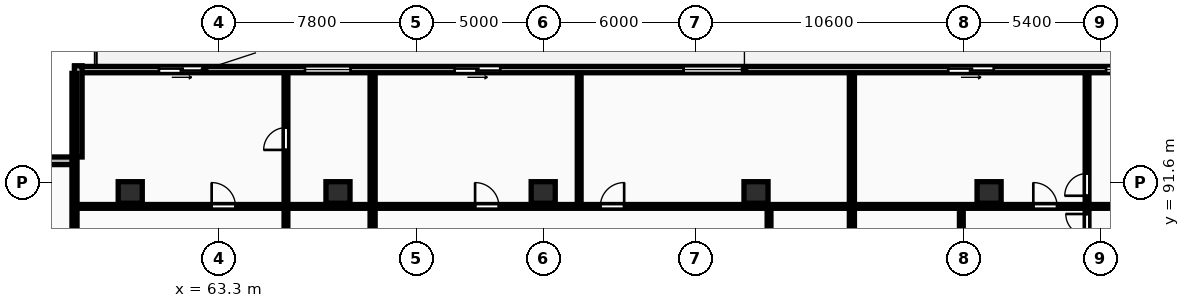
"""IFC4 building model, lengths in metres.
Left out: names, types, materials, properties, quantities, classifications, styles, units other than length and angle.
Written with IfcOpenShell. Run it as: python <this file> out.ifc"""

import sys

from ifc_helpers import new_model, si_unit, direction, frame, frame_2d, origin, origin_2d, place, context, subcontext, project, spatial, rectangle, extrude, element, fill, save


model = new_model("IFC4")
c1 = context("Model", 3, precision=1e-05, world=origin(), true_north=direction((0.0, 1.0)))
c2 = subcontext(c1, "Body", "Model", "MODEL_VIEW")
j1 = project(units=[si_unit("LENGTHUNIT", "METRE"), si_unit("PLANEANGLEUNIT", "RADIAN")], contexts=[c1])
p1 = place(None, origin())
s1 = spatial("IfcSite", under=j1, at=p1, CompositionType="ELEMENT")
p2 = place(p1, origin())
s2 = spatial("IfcBuilding", under=s1, at=p2, CompositionType="ELEMENT")
p3 = place(p2, frame((0.0, 0.0, 87.3)))
s3 = spatial("IfcBuildingStorey", under=s2, at=p3, CompositionType="ELEMENT", Elevation=87.3)
for number, where, z_axis, x_axis in (
    (1, (59.8, 91.2, 0.0), (0.0, 0.0, 1.0), (1.0, 0.0, 0.0)),
    (2, (68.0, 91.2, 0.0), (0.0, 0.0, 1.0), (1.0, 0.0, 0.0)),
    (3, (76.1, 91.2, 0.0), (0.0, 0.0, 1.0), (1.0, 0.0, 0.0)),
    (4, (84.5, 91.2, 0.0), (0.0, 0.0, 1.0), (1.0, 0.0, 0.0)),
    (5, (93.7, 91.2, 0.0), (0.0, 0.0, 1.0), (1.0, 0.0, 0.0)),
):
    element("IfcColumn", number, at=place(p3, frame(where, z_axis=z_axis, x_axis=x_axis)), inside=s3, PredefinedType="COLUMN", context=c2, shape_type="SweptSolid", body=[
        extrude(rectangle(XDim=0.95, YDim=0.85, at=origin_2d()), origin(), (0.0, 0.0, 1.0), 3.25),
    ])
p4 = place(p3, frame((130.6, 96.05, 0.0), z_axis=(0.0, 0.0, 1.0), x_axis=(-1.0, 0.0, 0.0)))
e6 = element("IfcWall", 6, at=p4, inside=s3, PredefinedType="STANDARD", context=c2, shape_type="SweptSolid", body=[
    extrude(rectangle(XDim=73.0, YDim=0.25, at=frame_2d((36.5, 0.0))), origin(), (0.0, 0.0, 1.0), 2.97),
])
p5 = place(p4, frame((67.867, 0.0, 0.0)))
e7 = element("IfcOpeningElement", 7, at=p5, cuts=e6, PredefinedType="OPENING", context=c2, shape_type="SweptSolid", body=[
    extrude(rectangle(XDim=1.8, YDim=2.2, at=frame_2d((0.9, 1.1))), frame((0.0, 0.135, 0.0), z_axis=(0.0, -1.0, 0.0), x_axis=(1.0, 0.0, 0.0)), (0.0, 0.0, 1.0), 0.27),
])
p6 = place(p4, frame((62.103, 0.0, 0.85)))
e8 = element("IfcOpeningElement", 8, at=p6, cuts=e6, PredefinedType="OPENING", context=c2, shape_type="SweptSolid", body=[
    extrude(rectangle(XDim=1.8, YDim=1.8, at=frame_2d((0.9, 0.9))), frame((0.0, 0.135, 0.0), z_axis=(0.0, -1.0, 0.0), x_axis=(1.0, 0.0, 0.0)), (0.0, 0.0, 1.0), 0.27),
])
p7 = place(p4, frame((56.196, 0.0, 0.0)))
e9 = element("IfcOpeningElement", 9, at=p7, cuts=e6, PredefinedType="OPENING", context=c2, shape_type="SweptSolid", body=[
    extrude(rectangle(XDim=1.8, YDim=2.2, at=frame_2d((0.9, 1.1))), frame((0.0, 0.135, 0.0), z_axis=(0.0, -1.0, 0.0), x_axis=(1.0, 0.0, 0.0)), (0.0, 0.0, 1.0), 0.27),
])
p8 = place(p4, frame((46.557, 0.0, 0.85)))
e10 = element("IfcOpeningElement", 10, at=p8, cuts=e6, PredefinedType="OPENING", context=c2, shape_type="SweptSolid", body=[
    extrude(rectangle(XDim=2.4, YDim=1.9, at=frame_2d((1.2, 0.95))), frame((0.0, 0.135, 0.0), z_axis=(0.0, -1.0, 0.0), x_axis=(1.0, 0.0, 0.0)), (0.0, 0.0, 1.0), 0.27),
])
p9 = place(p4, frame((36.714, 0.0, 0.0)))
e11 = element("IfcOpeningElement", 11, at=p9, cuts=e6, PredefinedType="OPENING", context=c2, shape_type="SweptSolid", body=[
    extrude(rectangle(XDim=1.8, YDim=2.2, at=frame_2d((0.9, 1.1))), frame((0.0, 0.135, 0.0), z_axis=(0.0, -1.0, 0.0), x_axis=(1.0, 0.0, 0.0)), (0.0, 0.0, 1.0), 0.27),
])
p10 = place(p4, frame((30.483, 0.0, 0.85)))
e12 = element("IfcOpeningElement", 12, at=p10, cuts=e6, PredefinedType="OPENING", context=c2, shape_type="SweptSolid", body=[
    extrude(rectangle(XDim=1.8, YDim=1.8, at=frame_2d((0.9, 0.9))), frame((0.0, 0.135, 0.0), z_axis=(0.0, -1.0, 0.0), x_axis=(1.0, 0.0, 0.0)), (0.0, 0.0, 1.0), 0.27),
])
p11 = place(p4, frame((21.29, 0.0, 0.85)))
e13 = element("IfcOpeningElement", 13, at=p11, cuts=e6, PredefinedType="OPENING", context=c2, shape_type="SweptSolid", body=[
    extrude(rectangle(XDim=2.4, YDim=1.9, at=frame_2d((1.2, 0.95))), frame((0.0, 0.135, 0.0), z_axis=(0.0, -1.0, 0.0), x_axis=(1.0, 0.0, 0.0)), (0.0, 0.0, 1.0), 0.27),
])
p12 = place(p4, frame((17.593, 0.0, 0.85)))
e14 = element("IfcOpeningElement", 14, at=p12, cuts=e6, PredefinedType="OPENING", context=c2, shape_type="SweptSolid", body=[
    extrude(rectangle(XDim=1.8, YDim=1.8, at=frame_2d((0.9, 0.9))), frame((0.0, 0.135, 0.0), z_axis=(0.0, -1.0, 0.0), x_axis=(1.0, 0.0, 0.0)), (0.0, 0.0, 1.0), 0.27),
])
p13 = place(p4, frame((26.153, 0.0, 0.0)))
e15 = element("IfcOpeningElement", 15, at=p13, cuts=e6, PredefinedType="OPENING", context=c2, shape_type="SweptSolid", body=[
    extrude(rectangle(XDim=1.8, YDim=2.2, at=frame_2d((0.9, 1.1))), frame((0.0, 0.135, 0.0), z_axis=(0.0, -1.0, 0.0), x_axis=(1.0, 0.0, 0.0)), (0.0, 0.0, 1.0), 0.27),
])
p14 = place(p4, frame((13.753, 0.0, 0.85)))
e16 = element("IfcOpeningElement", 16, at=p14, cuts=e6, PredefinedType="OPENING", context=c2, shape_type="SweptSolid", body=[
    extrude(rectangle(XDim=1.8, YDim=1.8, at=frame_2d((0.9, 0.9))), frame((0.0, 0.135, 0.0), z_axis=(0.0, -1.0, 0.0), x_axis=(1.0, 0.0, 0.0)), (0.0, 0.0, 1.0), 0.27),
])
p15 = place(p4, frame((7.363, 0.0, 0.0)))
e17 = element("IfcOpeningElement", 17, at=p15, cuts=e6, PredefinedType="OPENING", context=c2, shape_type="SweptSolid", body=[
    extrude(rectangle(XDim=1.8, YDim=2.2, at=frame_2d((0.9, 1.1))), frame((0.0, 0.135, 0.0), z_axis=(0.0, -1.0, 0.0), x_axis=(1.0, 0.0, 0.0)), (0.0, 0.0, 1.0), 0.27),
])
p16 = place(p4, frame((0.9, 0.0, 0.85)))
e18 = element("IfcOpeningElement", 18, at=p16, cuts=e6, PredefinedType="OPENING", context=c2, shape_type="SweptSolid", body=[
    extrude(rectangle(XDim=2.4, YDim=1.9, at=frame_2d((1.2, 0.95))), frame((0.0, 0.135, 0.0), z_axis=(0.0, -1.0, 0.0), x_axis=(1.0, 0.0, 0.0)), (0.0, 0.0, 1.0), 0.27),
])
p17 = place(p3, frame((57.75, 96.2, 0.0), z_axis=(0.0, 0.0, 1.0), x_axis=(0.0, -1.0, 0.0)))
e19 = element("IfcWall", 19, at=p17, inside=s3, PredefinedType="STANDARD", context=c2, shape_type="SweptSolid", body=[
    extrude(rectangle(XDim=3.6, YDim=0.3, at=frame_2d((1.8, 0.0))), origin(), (0.0, 0.0, 1.0), 2.97),
])
p18 = place(p3, frame((57.6, 92.45, 0.0), z_axis=(0.0, 0.0, 1.0), x_axis=(-1.0, 0.0, 0.0)))
e20 = element("IfcWall", 20, at=p18, inside=s3, PredefinedType="STANDARD", context=c2, shape_type="SweptSolid", body=[
    extrude(rectangle(XDim=3.6, YDim=0.3, at=frame_2d((1.8, 0.0))), origin(), (0.0, 0.0, 1.0), 2.97),
])
for number, where, z_axis, x_axis in (
    (21, (57.6, 69.43, 0.0), (0.0, 0.0, 1.0), (0.0, 1.0, 0.0)),
    (22, (69.367, 69.43, 0.0), (0.0, 0.0, 1.0), (0.0, 1.0, 0.0)),
):
    element("IfcWall", number, at=place(p3, frame(where, z_axis=z_axis, x_axis=x_axis)), inside=s3, PredefinedType="PARTITIONING", context=c2, shape_type="SweptSolid", body=[
        extrude(rectangle(XDim=26.47, YDim=0.2, at=frame_2d((13.235, 0.0))), origin(), (0.0, 0.0, 1.0), 2.97),
    ])
p19 = place(p3, frame((65.947, 85.59, 0.0), z_axis=(0.0, 0.0, 1.0), x_axis=(0.0, 1.0, 0.0)))
e23 = element("IfcWall", 23, at=p19, inside=s3, PredefinedType="PARTITIONING", context=c2, shape_type="SweptSolid", body=[
    extrude(rectangle(XDim=10.31, YDim=0.15, at=frame_2d((5.155, 0.0))), origin(), (0.0, 0.0, 1.0), 2.97),
])
p20 = place(p19, frame((1.43, 0.0, 0.0)))
e24 = element("IfcOpeningElement", 24, at=p20, cuts=e23, PredefinedType="OPENING", context=c2, shape_type="SweptSolid", body=[
    extrude(rectangle(XDim=0.84, YDim=2.04, at=frame_2d((0.42, 1.02))), frame((0.0, 0.085, 0.0), z_axis=(0.0, -1.0, 0.0), x_axis=(1.0, 0.0, 0.0)), (0.0, 0.0, 1.0), 0.17),
])
p21 = place(p19, frame((3.102, 0.0, 0.0)))
e25 = element("IfcOpeningElement", 25, at=p21, cuts=e23, PredefinedType="OPENING", context=c2, shape_type="SweptSolid", body=[
    extrude(rectangle(XDim=0.84, YDim=2.04, at=frame_2d((0.42, 1.02))), frame((0.0, 0.085, 0.0), z_axis=(0.0, -1.0, 0.0), x_axis=(1.0, 0.0, 0.0)), (0.0, 0.0, 1.0), 0.17),
])
p22 = place(p19, frame((7.29, 0.0, 0.0)))
e26 = element("IfcOpeningElement", 26, at=p22, cuts=e23, PredefinedType="OPENING", context=c2, shape_type="SweptSolid", body=[
    extrude(rectangle(XDim=0.88, YDim=2.06, at=frame_2d((0.44, 1.03))), frame((0.0, 0.085, 0.0), z_axis=(0.0, -1.0, 0.0), x_axis=(1.0, 0.0, 0.0)), (0.0, 0.0, 1.0), 0.17),
])
p23 = place(p3, frame((57.68, 90.65, 0.0), z_axis=(0.0, 0.0, 1.0), x_axis=(1.0, 0.0, 0.0)))
e27 = element("IfcWall", 27, at=p23, inside=s3, PredefinedType="PARTITIONING", context=c2, shape_type="SweptSolid", body=[
    extrude(rectangle(XDim=11.607, YDim=0.15, at=frame_2d((5.803, 0.0))), origin(), (0.0, 0.0, 1.0), 2.97),
])
p24 = place(p23, frame((5.333, 0.0, 0.0)))
e28 = element("IfcOpeningElement", 28, at=p24, cuts=e27, PredefinedType="OPENING", context=c2, shape_type="SweptSolid", body=[
    extrude(rectangle(XDim=0.94, YDim=2.1, at=frame_2d((0.47, 1.05))), frame((0.0, 0.085, 0.0), z_axis=(0.0, -1.0, 0.0), x_axis=(1.0, 0.0, 0.0)), (0.0, 0.0, 1.0), 0.17),
])
p25 = place(p3, frame((88.285, 69.43, 0.0), z_axis=(0.0, 0.0, 1.0), x_axis=(0.0, 1.0, 0.0)))
e29 = element("IfcWall", 29, at=p25, inside=s3, PredefinedType="PARTITIONING", context=c2, shape_type="SweptSolid", body=[
    extrude(rectangle(XDim=26.47, YDim=0.2, at=frame_2d((13.235, 0.0))), origin(), (0.0, 0.0, 1.0), 2.97),
])
p26 = place(p3, frame((85.015, 69.41, 0.0), z_axis=(0.0, 0.0, 1.0), x_axis=(0.0, 1.0, 0.0)))
e30 = element("IfcWall", 30, at=p26, inside=s3, PredefinedType="PARTITIONING", context=c2, shape_type="SweptSolid", body=[
    extrude(rectangle(XDim=21.18, YDim=0.15, at=frame_2d((10.59, 0.0))), origin(), (0.0, 0.0, 1.0), 2.97),
])
p27 = place(p26, frame((2.406, 0.0, 0.0)))
e31 = element("IfcOpeningElement", 31, at=p27, cuts=e30, PredefinedType="OPENING", context=c2, shape_type="SweptSolid", body=[
    extrude(rectangle(XDim=0.96, YDim=2.1, at=frame_2d((0.48, 1.05))), frame((0.0, 0.085, 0.0), z_axis=(0.0, -1.0, 0.0), x_axis=(1.0, 0.0, 0.0)), (0.0, 0.0, 1.0), 0.17),
])
p28 = place(p26, frame((6.133, 0.0, 0.0)))
e32 = element("IfcOpeningElement", 32, at=p28, cuts=e30, PredefinedType="OPENING", context=c2, shape_type="SweptSolid", body=[
    extrude(rectangle(XDim=0.88, YDim=2.06, at=frame_2d((0.44, 1.03))), frame((0.0, 0.085, 0.0), z_axis=(0.0, -1.0, 0.0), x_axis=(1.0, 0.0, 0.0)), (0.0, 0.0, 1.0), 0.17),
])
p29 = place(p26, frame((12.003, 0.0, 0.0)))
e33 = element("IfcOpeningElement", 33, at=p29, cuts=e30, PredefinedType="OPENING", context=c2, shape_type="SweptSolid", body=[
    extrude(rectangle(XDim=0.84, YDim=2.04, at=frame_2d((0.42, 1.02))), frame((0.0, 0.085, 0.0), z_axis=(0.0, -1.0, 0.0), x_axis=(1.0, 0.0, 0.0)), (0.0, 0.0, 1.0), 0.17),
])
p30 = place(p3, frame((77.521, 90.73, 0.0), z_axis=(0.0, 0.0, 1.0), x_axis=(0.0, 1.0, 0.0)))
e34 = element("IfcWall", 34, at=p30, inside=s3, PredefinedType="PARTITIONING", context=c2, shape_type="SweptSolid", body=[
    extrude(rectangle(XDim=5.17, YDim=0.15, at=frame_2d((2.585, 0.0))), origin(), (0.0, 0.0, 1.0), 2.97),
])
p31 = place(p3, frame((69.447, 90.65, 0.0), z_axis=(0.0, 0.0, 1.0), x_axis=(1.0, 0.0, 0.0)))
e35 = element("IfcWall", 35, at=p31, inside=s3, PredefinedType="PARTITIONING", context=c2, shape_type="SweptSolid", body=[
    extrude(rectangle(XDim=18.758, YDim=0.15, at=frame_2d((9.379, 0.0))), origin(), (0.0, 0.0, 1.0), 2.97),
])
p32 = place(p31, frame((3.965, 0.0, 0.0)))
e36 = element("IfcOpeningElement", 36, at=p32, cuts=e35, PredefinedType="OPENING", context=c2, shape_type="SweptSolid", body=[
    extrude(rectangle(XDim=0.94, YDim=2.1, at=frame_2d((0.47, 1.05))), frame((0.0, 0.085, 0.0), z_axis=(0.0, -1.0, 0.0), x_axis=(1.0, 0.0, 0.0)), (0.0, 0.0, 1.0), 0.17),
])
p33 = place(p31, frame((8.909, 0.0, 0.0)))
e37 = element("IfcOpeningElement", 37, at=p33, cuts=e35, PredefinedType="OPENING", context=c2, shape_type="SweptSolid", body=[
    extrude(rectangle(XDim=0.94, YDim=2.1, at=frame_2d((0.47, 1.05))), frame((0.0, 0.085, 0.0), z_axis=(0.0, -1.0, 0.0), x_axis=(1.0, 0.0, 0.0)), (0.0, 0.0, 1.0), 0.17),
])
p34 = place(p3, frame((92.604, 85.59, 0.0), z_axis=(0.0, 0.0, 1.0), x_axis=(0.0, 1.0, 0.0)))
e38 = element("IfcWall", 38, at=p34, inside=s3, PredefinedType="PARTITIONING", context=c2, shape_type="SweptSolid", body=[
    extrude(rectangle(XDim=5.0, YDim=0.15, at=frame_2d((2.5, 0.0))), origin(), (0.0, 0.0, 1.0), 2.97),
])
p35 = place(p34, frame((2.06, 0.0, 0.0)))
e39 = element("IfcOpeningElement", 39, at=p35, cuts=e38, PredefinedType="OPENING", context=c2, shape_type="SweptSolid", body=[
    extrude(rectangle(XDim=0.88, YDim=2.06, at=frame_2d((0.44, 1.03))), frame((0.0, 0.085, 0.0), z_axis=(0.0, -1.0, 0.0), x_axis=(1.0, 0.0, 0.0)), (0.0, 0.0, 1.0), 0.17),
])
p36 = place(p3, frame((97.567, 85.59, 0.0), z_axis=(0.0, 0.0, 1.0), x_axis=(0.0, 1.0, 0.0)))
e40 = element("IfcWall", 40, at=p36, inside=s3, PredefinedType="PARTITIONING", context=c2, shape_type="SweptSolid", body=[
    extrude(rectangle(XDim=10.31, YDim=0.15, at=frame_2d((5.155, 0.0))), origin(), (0.0, 0.0, 1.0), 2.97),
])
p37 = place(p36, frame((1.43, 0.0, 0.0)))
e41 = element("IfcOpeningElement", 41, at=p37, cuts=e40, PredefinedType="OPENING", context=c2, shape_type="SweptSolid", body=[
    extrude(rectangle(XDim=0.84, YDim=2.04, at=frame_2d((0.42, 1.02))), frame((0.0, 0.085, 0.0), z_axis=(0.0, -1.0, 0.0), x_axis=(1.0, 0.0, 0.0)), (0.0, 0.0, 1.0), 0.17),
])
p38 = place(p36, frame((3.92, 0.0, 0.0)))
e42 = element("IfcOpeningElement", 42, at=p38, cuts=e40, PredefinedType="OPENING", context=c2, shape_type="SweptSolid", body=[
    extrude(rectangle(XDim=0.84, YDim=2.04, at=frame_2d((0.42, 1.02))), frame((0.0, 0.085, 0.0), z_axis=(0.0, -1.0, 0.0), x_axis=(1.0, 0.0, 0.0)), (0.0, 0.0, 1.0), 0.17),
])
p39 = place(p36, frame((5.48, 0.0, 0.0)))
e43 = element("IfcOpeningElement", 43, at=p39, cuts=e40, PredefinedType="OPENING", context=c2, shape_type="SweptSolid", body=[
    extrude(rectangle(XDim=0.88, YDim=2.06, at=frame_2d((0.44, 1.03))), frame((0.0, 0.085, 0.0), z_axis=(0.0, -1.0, 0.0), x_axis=(1.0, 0.0, 0.0)), (0.0, 0.0, 1.0), 0.17),
])
p40 = place(p3, frame((88.365, 90.65, 0.0), z_axis=(0.0, 0.0, 1.0), x_axis=(1.0, 0.0, 0.0)))
e44 = element("IfcWall", 44, at=p40, inside=s3, PredefinedType="PARTITIONING", context=c2, shape_type="SweptSolid", body=[
    extrude(rectangle(XDim=12.543, YDim=0.15, at=frame_2d((6.271, 0.0))), origin(), (0.0, 0.0, 1.0), 2.97),
])
p41 = place(p40, frame((7.081, 0.0, 0.0)))
e45 = element("IfcOpeningElement", 45, at=p41, cuts=e44, PredefinedType="OPENING", context=c2, shape_type="SweptSolid", body=[
    extrude(rectangle(XDim=0.94, YDim=2.1, at=frame_2d((0.47, 1.05))), frame((0.0, 0.085, 0.0), z_axis=(0.0, -1.0, 0.0), x_axis=(1.0, 0.0, 0.0)), (0.0, 0.0, 1.0), 0.17),
])
p42 = place(p5, origin())
e46 = element("IfcDoor", 46, at=p42, inside=s3, OperationType="SLIDING_TO_LEFT", PredefinedType="DOOR", context=c2, shape_type="SweptSolid", body=[
    extrude(rectangle(XDim=1.8, YDim=2.2, at=frame_2d((0.9, 1.1))), frame((0.0, 0.025, 0.0), z_axis=(0.0, -1.0, 0.0), x_axis=(1.0, 0.0, 0.0)), (0.0, 0.0, 1.0), 0.05),
])
fill(e7, e46)
p43 = place(p6, origin())
e47 = element("IfcWindow", 47, at=p43, inside=s3, PartitioningType="SINGLE_PANEL", PredefinedType="WINDOW", context=c2, shape_type="SweptSolid", body=[
    extrude(rectangle(XDim=1.8, YDim=1.8, at=frame_2d((0.9, 0.9))), frame((0.0, 0.03, 0.0), z_axis=(0.0, -1.0, 0.0), x_axis=(1.0, 0.0, 0.0)), (0.0, 0.0, 1.0), 0.06),
])
fill(e8, e47)
p44 = place(p7, origin())
e48 = element("IfcDoor", 48, at=p44, inside=s3, OperationType="SLIDING_TO_LEFT", PredefinedType="DOOR", context=c2, shape_type="SweptSolid", body=[
    extrude(rectangle(XDim=1.8, YDim=2.2, at=frame_2d((0.9, 1.1))), frame((0.0, 0.025, 0.0), z_axis=(0.0, -1.0, 0.0), x_axis=(1.0, 0.0, 0.0)), (0.0, 0.0, 1.0), 0.05),
])
fill(e9, e48)
p45 = place(p8, origin())
e49 = element("IfcWindow", 49, at=p45, inside=s3, PartitioningType="DOUBLE_PANEL_VERTICAL", PredefinedType="WINDOW", context=c2, shape_type="SweptSolid", body=[
    extrude(rectangle(XDim=2.4, YDim=1.9, at=frame_2d((1.2, 0.95))), frame((0.0, 0.03, 0.0), z_axis=(0.0, -1.0, 0.0), x_axis=(1.0, 0.0, 0.0)), (0.0, 0.0, 1.0), 0.06),
])
fill(e10, e49)
p46 = place(p9, origin())
e50 = element("IfcDoor", 50, at=p46, inside=s3, OperationType="SLIDING_TO_LEFT", PredefinedType="DOOR", context=c2, shape_type="SweptSolid", body=[
    extrude(rectangle(XDim=1.8, YDim=2.2, at=frame_2d((0.9, 1.1))), frame((0.0, 0.025, 0.0), z_axis=(0.0, -1.0, 0.0), x_axis=(1.0, 0.0, 0.0)), (0.0, 0.0, 1.0), 0.05),
])
fill(e11, e50)
p47 = place(p10, origin())
e51 = element("IfcWindow", 51, at=p47, inside=s3, PartitioningType="SINGLE_PANEL", PredefinedType="WINDOW", context=c2, shape_type="SweptSolid", body=[
    extrude(rectangle(XDim=1.8, YDim=1.8, at=frame_2d((0.9, 0.9))), frame((0.0, 0.03, 0.0), z_axis=(0.0, -1.0, 0.0), x_axis=(1.0, 0.0, 0.0)), (0.0, 0.0, 1.0), 0.06),
])
fill(e12, e51)
p48 = place(p22, origin())
e52 = element("IfcDoor", 52, at=p48, inside=s3, OperationType="SINGLE_SWING_LEFT", PredefinedType="DOOR", context=c2, shape_type="SweptSolid", body=[
    extrude(rectangle(XDim=0.88, YDim=2.06, at=frame_2d((0.44, 1.03))), frame((0.0, 0.025, 0.0), z_axis=(0.0, -1.0, 0.0), x_axis=(1.0, 0.0, 0.0)), (0.0, 0.0, 1.0), 0.05),
])
fill(e26, e52)
p49 = place(p24, origin())
e53 = element("IfcDoor", 53, at=p49, inside=s3, OperationType="SINGLE_SWING_LEFT", PredefinedType="DOOR", context=c2, shape_type="SweptSolid", body=[
    extrude(rectangle(XDim=0.94, YDim=2.1, at=frame_2d((0.47, 1.05))), frame((0.0, 0.025, 0.0), z_axis=(0.0, -1.0, 0.0), x_axis=(1.0, 0.0, 0.0)), (0.0, 0.0, 1.0), 0.05),
])
fill(e28, e53)
p50 = place(p32, origin())
e54 = element("IfcDoor", 54, at=p50, inside=s3, OperationType="SINGLE_SWING_LEFT", PredefinedType="DOOR", context=c2, shape_type="SweptSolid", body=[
    extrude(rectangle(XDim=0.94, YDim=2.1, at=frame_2d((0.47, 1.05))), frame((0.0, 0.025, 0.0), z_axis=(0.0, -1.0, 0.0), x_axis=(1.0, 0.0, 0.0)), (0.0, 0.0, 1.0), 0.05),
])
fill(e36, e54)
p51 = place(p33, origin())
e55 = element("IfcDoor", 55, at=p51, inside=s3, OperationType="SINGLE_SWING_RIGHT", PredefinedType="DOOR", context=c2, shape_type="SweptSolid", body=[
    extrude(rectangle(XDim=0.94, YDim=2.1, at=frame_2d((0.47, 1.05))), frame((0.0, 0.025, 0.0), z_axis=(0.0, -1.0, 0.0), x_axis=(1.0, 0.0, 0.0)), (0.0, 0.0, 1.0), 0.05),
])
fill(e37, e55)
p52 = place(p38, origin())
e56 = element("IfcDoor", 56, at=p52, inside=s3, OperationType="SINGLE_SWING_RIGHT", PredefinedType="DOOR", context=c2, shape_type="SweptSolid", body=[
    extrude(rectangle(XDim=0.84, YDim=2.04, at=frame_2d((0.42, 1.02))), frame((0.0, 0.025, 0.0), z_axis=(0.0, -1.0, 0.0), x_axis=(1.0, 0.0, 0.0)), (0.0, 0.0, 1.0), 0.05),
])
fill(e42, e56)
p53 = place(p39, origin())
e57 = element("IfcDoor", 57, at=p53, inside=s3, OperationType="SINGLE_SWING_LEFT", PredefinedType="DOOR", context=c2, shape_type="SweptSolid", body=[
    extrude(rectangle(XDim=0.88, YDim=2.06, at=frame_2d((0.44, 1.03))), frame((0.0, 0.025, 0.0), z_axis=(0.0, -1.0, 0.0), x_axis=(1.0, 0.0, 0.0)), (0.0, 0.0, 1.0), 0.05),
])
fill(e43, e57)
p54 = place(p41, origin())
e58 = element("IfcDoor", 58, at=p54, inside=s3, OperationType="SINGLE_SWING_LEFT", PredefinedType="DOOR", context=c2, shape_type="SweptSolid", body=[
    extrude(rectangle(XDim=0.94, YDim=2.1, at=frame_2d((0.47, 1.05))), frame((0.0, 0.025, 0.0), z_axis=(0.0, -1.0, 0.0), x_axis=(1.0, 0.0, 0.0)), (0.0, 0.0, 1.0), 0.05),
])
fill(e45, e58)
save(model, sys.argv[1])
